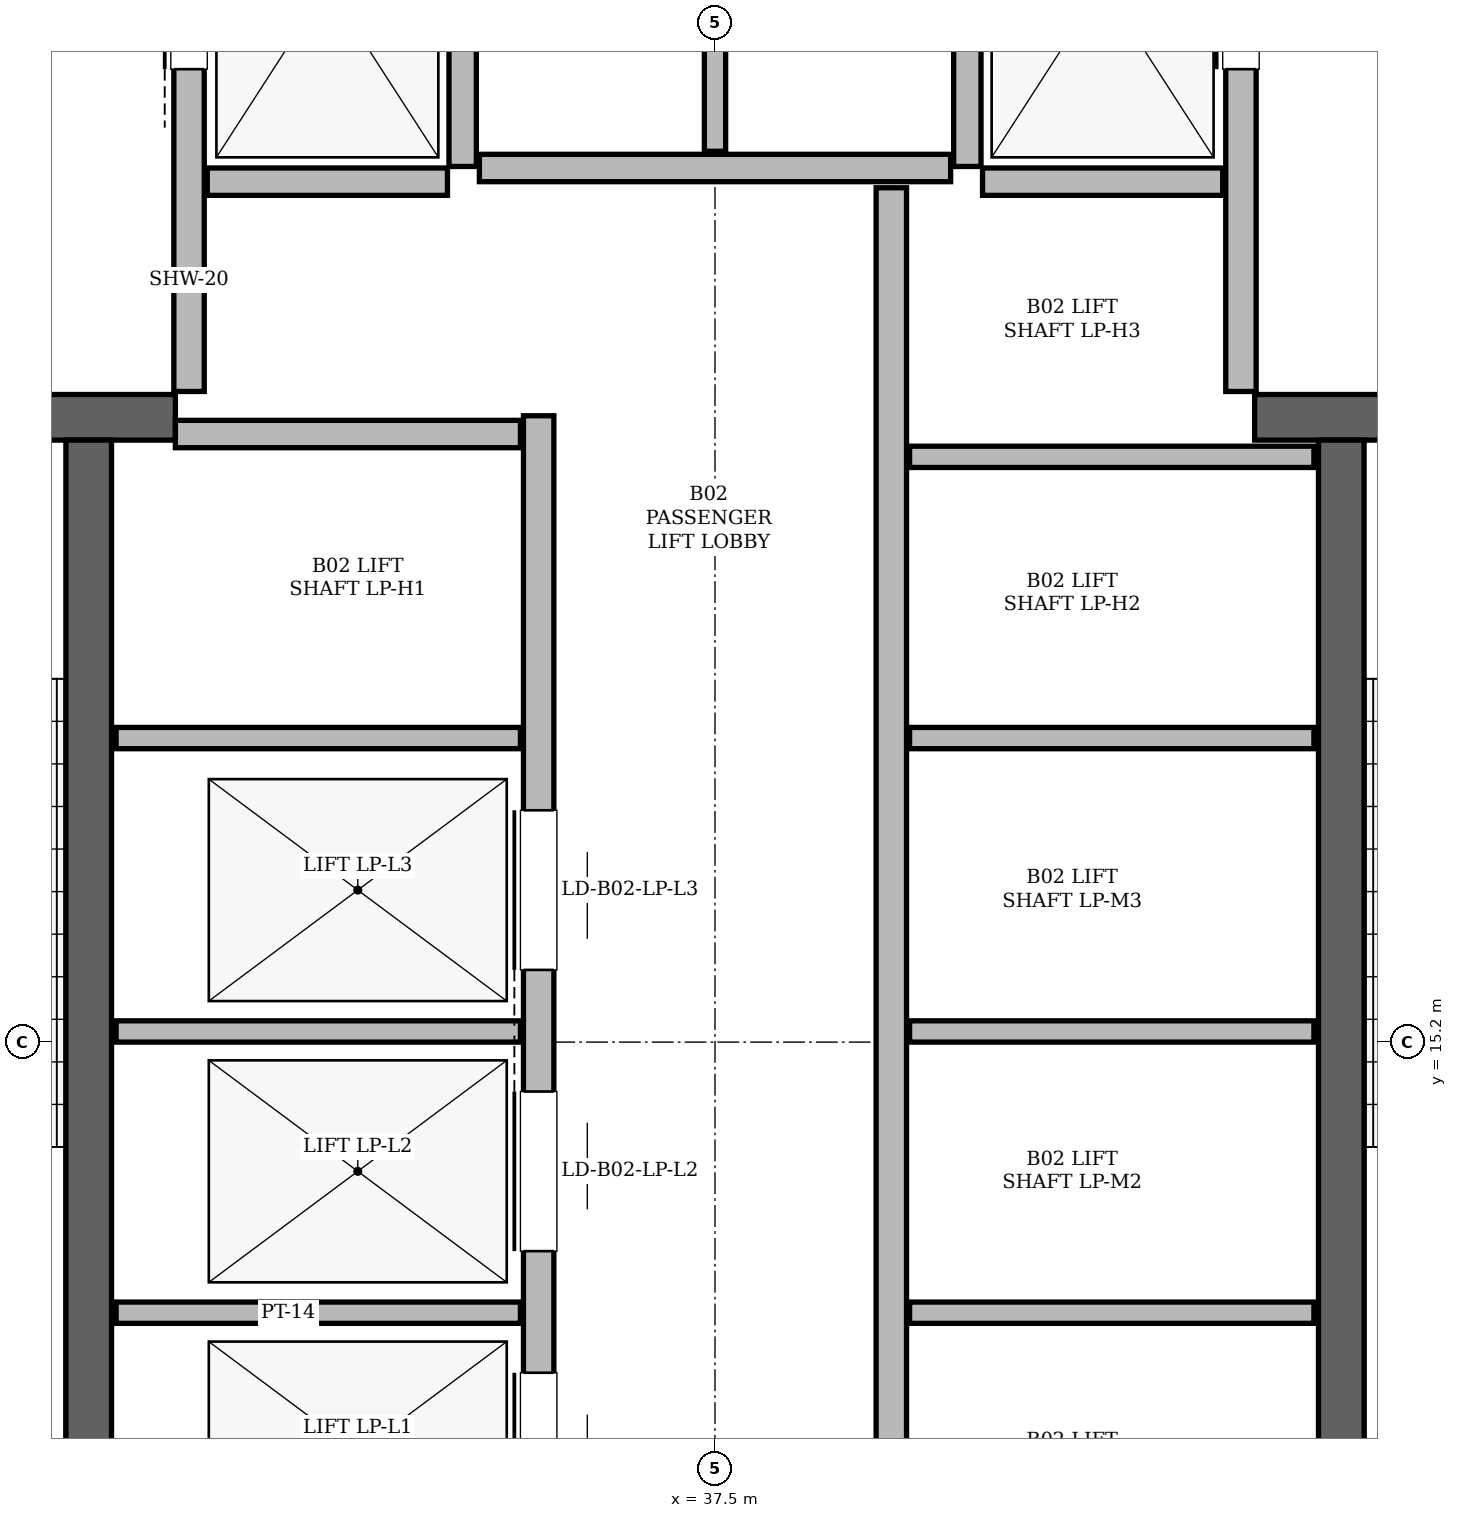
"""IFC4 building model, lengths in metres.
Left out: names, types, materials, properties, quantities, classifications, styles, units other than length and angle.
Written with IfcOpenShell. Run it as: python <this file> out.ifc"""

import sys

from ifc_helpers import new_model, si_unit, direction, frame, frame_2d, origin, place, context, subcontext, project, spatial, rectangle, extrude, element, fill, save


model = new_model("IFC4")
c1 = context("Model", 3, precision=1e-05, world=origin(), true_north=direction((0.0, 1.0)))
c2 = subcontext(c1, "Body", "Model", "MODEL_VIEW")
j1 = project(units=[si_unit("LENGTHUNIT", "METRE"), si_unit("PLANEANGLEUNIT", "RADIAN")], contexts=[c1])
p1 = place(None, origin())
s1 = spatial("IfcSite", under=j1, at=p1, CompositionType="ELEMENT")
p2 = place(p1, origin())
s2 = spatial("IfcBuilding", under=s1, at=p2, CompositionType="ELEMENT")
p3 = place(p2, frame((0.0, 0.0, -8.0)))
s3 = spatial("IfcBuildingStorey", under=s2, at=p3, CompositionType="ELEMENT", Elevation=-8.0)
p4 = place(p3, frame((29.94, 19.31, 0.0), z_axis=(0.0, 0.0, 1.0), x_axis=(1.0, 0.0, 0.0)))
e1 = element("IfcWall", 1, at=p4, inside=s3, PredefinedType="SHEAR", context=c2, shape_type="SweptSolid", body=[
    extrude(rectangle(XDim=4.01, YDim=0.3, at=frame_2d((2.005, 0.0))), origin(), (0.0, 0.0, 1.0), 3.72),
])
p5 = place(p4, frame((1.01, 0.0, 0.0)))
e2 = element("IfcOpeningElement", 2, at=p5, cuts=e1, PredefinedType="OPENING", context=c2, shape_type="SweptSolid", body=[
    extrude(rectangle(XDim=1.4, YDim=2.2, at=frame_2d((0.7, 1.1))), frame((0.0, 0.15, 0.0), z_axis=(0.0, -1.0, 0.0), x_axis=(1.0, 0.0, 0.0)), (0.0, 0.0, 1.0), 0.3),
])
p6 = place(p3, frame((41.05, 19.31, 0.0), z_axis=(0.0, 0.0, 1.0), x_axis=(1.0, 0.0, 0.0)))
e3 = element("IfcWall", 3, at=p6, inside=s3, PredefinedType="SHEAR", context=c2, shape_type="SweptSolid", body=[
    extrude(rectangle(XDim=4.01, YDim=0.3, at=frame_2d((2.005, 0.0))), origin(), (0.0, 0.0, 1.0), 3.72),
])
p7 = place(p6, frame((1.6, 0.0, 0.0)))
e4 = element("IfcOpeningElement", 4, at=p7, cuts=e3, PredefinedType="OPENING", context=c2, shape_type="SweptSolid", body=[
    extrude(rectangle(XDim=1.4, YDim=2.2, at=frame_2d((0.7, 1.1))), frame((0.0, 0.15, 0.0), z_axis=(0.0, -1.0, 0.0), x_axis=(1.0, 0.0, 0.0)), (0.0, 0.0, 1.0), 0.3),
])
for number, where, z_axis, x_axis in (
    (5, (33.38, 11.54, 0.0), (0.0, 0.0, 1.0), (0.0, 1.0, 0.0)),
    (6, (41.62, 11.54, 0.0), (0.0, 0.0, 1.0), (0.0, 1.0, 0.0)),
):
    element("IfcWall", number, at=place(p3, frame(where, z_axis=z_axis, x_axis=x_axis)), inside=s3, PredefinedType="SHEAR", context=c2, shape_type="SweptSolid", body=[
        extrude(rectangle(XDim=7.62, YDim=0.3, at=frame_2d((3.81, 0.0))), origin(), (0.0, 0.0, 1.0), 3.72),
    ])
p8 = place(p3, frame((34.04, 19.48, 0.0), z_axis=(0.0, 0.0, 1.0), x_axis=(0.0, 1.0, 0.0)))
e7 = element("IfcWall", 7, at=p8, inside=s3, PredefinedType="PARTITIONING", context=c2, shape_type="SweptSolid", body=[
    extrude(rectangle(XDim=4.5, YDim=0.2, at=frame_2d((2.25, 0.0))), origin(), (0.0, 0.0, 1.0), 2.76),
])
p9 = place(p8, frame((2.12, 0.0, 0.0)))
e8 = element("IfcOpeningElement", 8, at=p9, cuts=e7, PredefinedType="OPENING", context=c2, shape_type="SweptSolid", body=[
    extrude(rectangle(XDim=1.1, YDim=2.2, at=frame_2d((0.55, 1.1))), frame((0.0, 0.1, 0.0), z_axis=(0.0, -1.0, 0.0), x_axis=(1.0, 0.0, 0.0)), (0.0, 0.0, 1.0), 0.2),
])
p10 = place(p3, frame((35.84, 20.96, 0.0), z_axis=(0.0, 0.0, 1.0), x_axis=(0.0, 1.0, 0.0)))
e9 = element("IfcWall", 9, at=p10, inside=s3, PredefinedType="PARTITIONING", context=c2, shape_type="SweptSolid", body=[
    extrude(rectangle(XDim=3.02, YDim=0.18, at=frame_2d((1.51, 0.0))), origin(), (0.0, 0.0, 1.0), 2.76),
])
p11 = place(p3, frame((34.16, 20.86, 0.0), z_axis=(0.0, 0.0, 1.0), x_axis=(1.0, 0.0, 0.0)))
e10 = element("IfcWall", 10, at=p11, inside=s3, PredefinedType="PARTITIONING", context=c2, shape_type="SweptSolid", body=[
    extrude(rectangle(XDim=1.58, YDim=0.18, at=frame_2d((0.79, 0.0))), origin(), (0.0, 0.0, 1.0), 3.72),
])
p12 = place(p3, frame((40.96, 19.48, 0.0), z_axis=(0.0, 0.0, 1.0), x_axis=(0.0, 1.0, 0.0)))
e11 = element("IfcWall", 11, at=p12, inside=s3, PredefinedType="PARTITIONING", context=c2, shape_type="SweptSolid", body=[
    extrude(rectangle(XDim=4.5, YDim=0.2, at=frame_2d((2.25, 0.0))), origin(), (0.0, 0.0, 1.0), 2.76),
])
p13 = place(p12, frame((2.12, 0.0, 0.0)))
e12 = element("IfcOpeningElement", 12, at=p13, cuts=e11, PredefinedType="OPENING", context=c2, shape_type="SweptSolid", body=[
    extrude(rectangle(XDim=1.1, YDim=2.2, at=frame_2d((0.55, 1.1))), frame((0.0, 0.1, 0.0), z_axis=(0.0, -1.0, 0.0), x_axis=(1.0, 0.0, 0.0)), (0.0, 0.0, 1.0), 0.2),
])
p14 = place(p3, frame((39.16, 20.96, 0.0), z_axis=(0.0, 0.0, 1.0), x_axis=(0.0, 1.0, 0.0)))
e13 = element("IfcWall", 13, at=p14, inside=s3, PredefinedType="PARTITIONING", context=c2, shape_type="SweptSolid", body=[
    extrude(rectangle(XDim=3.02, YDim=0.18, at=frame_2d((1.51, 0.0))), origin(), (0.0, 0.0, 1.0), 2.76),
])
p15 = place(p3, frame((39.26, 20.86, 0.0), z_axis=(0.0, 0.0, 1.0), x_axis=(1.0, 0.0, 0.0)))
e14 = element("IfcWall", 14, at=p15, inside=s3, PredefinedType="PARTITIONING", context=c2, shape_type="SweptSolid", body=[
    extrude(rectangle(XDim=1.58, YDim=0.18, at=frame_2d((0.79, 0.0))), origin(), (0.0, 0.0, 1.0), 3.72),
])
p16 = place(p3, frame((36.34, 11.72, 0.0), z_axis=(0.0, 0.0, 1.0), x_axis=(0.0, 1.0, 0.0)))
e15 = element("IfcWall", 15, at=p16, inside=s3, PredefinedType="PARTITIONING", context=c2, shape_type="SweptSolid", body=[
    extrude(rectangle(XDim=7.6, YDim=0.2, at=frame_2d((3.8, 0.0))), origin(), (0.0, 0.0, 1.0), 3.72),
])
p17 = place(p16, frame((0.255, 0.0, 0.0)))
e16 = element("IfcOpeningElement", 16, at=p17, cuts=e15, PredefinedType="OPENING", context=c2, shape_type="SweptSolid", body=[
    extrude(rectangle(XDim=1.05, YDim=2.15, at=frame_2d((0.525, 1.075))), frame((0.0, 0.1, 0.0), z_axis=(0.0, -1.0, 0.0), x_axis=(1.0, 0.0, 0.0)), (0.0, 0.0, 1.0), 0.2),
])
p18 = place(p16, frame((2.105, 0.0, 0.0)))
e17 = element("IfcOpeningElement", 17, at=p18, cuts=e15, PredefinedType="OPENING", context=c2, shape_type="SweptSolid", body=[
    extrude(rectangle(XDim=1.05, YDim=2.15, at=frame_2d((0.525, 1.075))), frame((0.0, 0.1, 0.0), z_axis=(0.0, -1.0, 0.0), x_axis=(1.0, 0.0, 0.0)), (0.0, 0.0, 1.0), 0.2),
])
p19 = place(p16, frame((3.955, 0.0, 0.0)))
e18 = element("IfcOpeningElement", 18, at=p19, cuts=e15, PredefinedType="OPENING", context=c2, shape_type="SweptSolid", body=[
    extrude(rectangle(XDim=1.05, YDim=2.15, at=frame_2d((0.525, 1.075))), frame((0.0, 0.1, 0.0), z_axis=(0.0, -1.0, 0.0), x_axis=(1.0, 0.0, 0.0)), (0.0, 0.0, 1.0), 0.2),
])
p20 = place(p3, frame((33.95, 19.2, 0.0), z_axis=(0.0, 0.0, 1.0), x_axis=(1.0, 0.0, 0.0)))
e19 = element("IfcWall", 19, at=p20, inside=s3, PredefinedType="PARTITIONING", context=c2, shape_type="SweptSolid", body=[
    extrude(rectangle(XDim=2.27, YDim=0.18, at=frame_2d((1.135, 0.0))), origin(), (0.0, 0.0, 1.0), 3.72),
])
for number, where, z_axis, x_axis in (
    (20, (33.56, 13.42, 0.0), (0.0, 0.0, 1.0), (1.0, 0.0, 0.0)),
    (21, (33.56, 15.27, 0.0), (0.0, 0.0, 1.0), (1.0, 0.0, 0.0)),
    (22, (33.56, 17.2, 0.0), (0.0, 0.0, 1.0), (1.0, 0.0, 0.0)),
):
    element("IfcWall", number, at=place(p3, frame(where, z_axis=z_axis, x_axis=x_axis)), inside=s3, PredefinedType="PARTITIONING", context=c2, shape_type="SweptSolid", body=[
        extrude(rectangle(XDim=2.66, YDim=0.14, at=frame_2d((1.33, 0.0))), origin(), (0.0, 0.0, 1.0), 3.72),
    ])
p21 = place(p3, frame((38.66, 11.72, 0.0), z_axis=(0.0, 0.0, 1.0), x_axis=(0.0, 1.0, 0.0)))
e23 = element("IfcWall", 23, at=p21, inside=s3, PredefinedType="PARTITIONING", context=c2, shape_type="SweptSolid", body=[
    extrude(rectangle(XDim=9.1, YDim=0.2, at=frame_2d((4.55, 0.0))), origin(), (0.0, 0.0, 1.0), 3.72),
])
for number, where, z_axis, x_axis in (
    (24, (38.78, 13.42, 0.0), (0.0, 0.0, 1.0), (1.0, 0.0, 0.0)),
    (25, (38.78, 15.27, 0.0), (0.0, 0.0, 1.0), (1.0, 0.0, 0.0)),
    (26, (38.78, 17.2, 0.0), (0.0, 0.0, 1.0), (1.0, 0.0, 0.0)),
    (27, (38.78, 19.05, 0.0), (0.0, 0.0, 1.0), (1.0, 0.0, 0.0)),
):
    element("IfcWall", number, at=place(p3, frame(where, z_axis=z_axis, x_axis=x_axis)), inside=s3, PredefinedType="PARTITIONING", context=c2, shape_type="SweptSolid", body=[
        extrude(rectangle(XDim=2.66, YDim=0.14, at=frame_2d((1.33, 0.0))), origin(), (0.0, 0.0, 1.0), 3.72),
    ])
p22 = place(p3, frame((35.95, 20.95, 0.0), z_axis=(0.0, 0.0, 1.0), x_axis=(1.0, 0.0, 0.0)))
e28 = element("IfcWall", 28, at=p22, inside=s3, PredefinedType="PARTITIONING", context=c2, shape_type="SweptSolid", body=[
    extrude(rectangle(XDim=3.1, YDim=0.18, at=frame_2d((1.55, 0.0))), origin(), (0.0, 0.0, 1.0), 3.72),
])
p23 = place(p3, frame((37.5, 21.06, 0.0), z_axis=(0.0, 0.0, 1.0), x_axis=(0.0, 1.0, 0.0)))
e29 = element("IfcWall", 29, at=p23, inside=s3, PredefinedType="PARTITIONING", context=c2, shape_type="SweptSolid", body=[
    extrude(rectangle(XDim=2.92, YDim=0.14, at=frame_2d((1.46, 0.0))), origin(), (0.0, 0.0, 1.0), 2.76),
])
p24 = place(p9, origin())
e30 = element("IfcDoor", 30, at=p24, inside=s3, OperationType="SLIDING_TO_LEFT", PredefinedType="DOOR", context=c2, shape_type="SweptSolid", body=[
    extrude(rectangle(XDim=1.1, YDim=2.2, at=frame_2d((0.55, 1.1))), frame((0.0, 0.025, 0.0), z_axis=(0.0, -1.0, 0.0), x_axis=(1.0, 0.0, 0.0)), (0.0, 0.0, 1.0), 0.05),
])
fill(e8, e30)
p25 = place(p13, origin())
e31 = element("IfcDoor", 31, at=p25, inside=s3, OperationType="SLIDING_TO_RIGHT", PredefinedType="DOOR", context=c2, shape_type="SweptSolid", body=[
    extrude(rectangle(XDim=1.1, YDim=2.2, at=frame_2d((0.55, 1.1))), frame((0.0, 0.025, 0.0), z_axis=(0.0, -1.0, 0.0), x_axis=(1.0, 0.0, 0.0)), (0.0, 0.0, 1.0), 0.05),
])
fill(e12, e31)
p26 = place(p17, origin())
e32 = element("IfcDoor", 32, at=p26, inside=s3, OperationType="SLIDING_TO_LEFT", PredefinedType="DOOR", context=c2, shape_type="SweptSolid", body=[
    extrude(rectangle(XDim=1.05, YDim=2.15, at=frame_2d((0.525, 1.075))), frame((0.0, 0.025, 0.0), z_axis=(0.0, -1.0, 0.0), x_axis=(1.0, 0.0, 0.0)), (0.0, 0.0, 1.0), 0.05),
])
fill(e16, e32)
p27 = place(p18, origin())
e33 = element("IfcDoor", 33, at=p27, inside=s3, OperationType="SLIDING_TO_RIGHT", PredefinedType="DOOR", context=c2, shape_type="SweptSolid", body=[
    extrude(rectangle(XDim=1.05, YDim=2.15, at=frame_2d((0.525, 1.075))), frame((0.0, 0.025, 0.0), z_axis=(0.0, -1.0, 0.0), x_axis=(1.0, 0.0, 0.0)), (0.0, 0.0, 1.0), 0.05),
])
fill(e17, e33)
p28 = place(p19, origin())
e34 = element("IfcDoor", 34, at=p28, inside=s3, OperationType="SLIDING_TO_LEFT", PredefinedType="DOOR", context=c2, shape_type="SweptSolid", body=[
    extrude(rectangle(XDim=1.05, YDim=2.15, at=frame_2d((0.525, 1.075))), frame((0.0, 0.025, 0.0), z_axis=(0.0, -1.0, 0.0), x_axis=(1.0, 0.0, 0.0)), (0.0, 0.0, 1.0), 0.05),
])
fill(e18, e34)
save(model, sys.argv[1])
